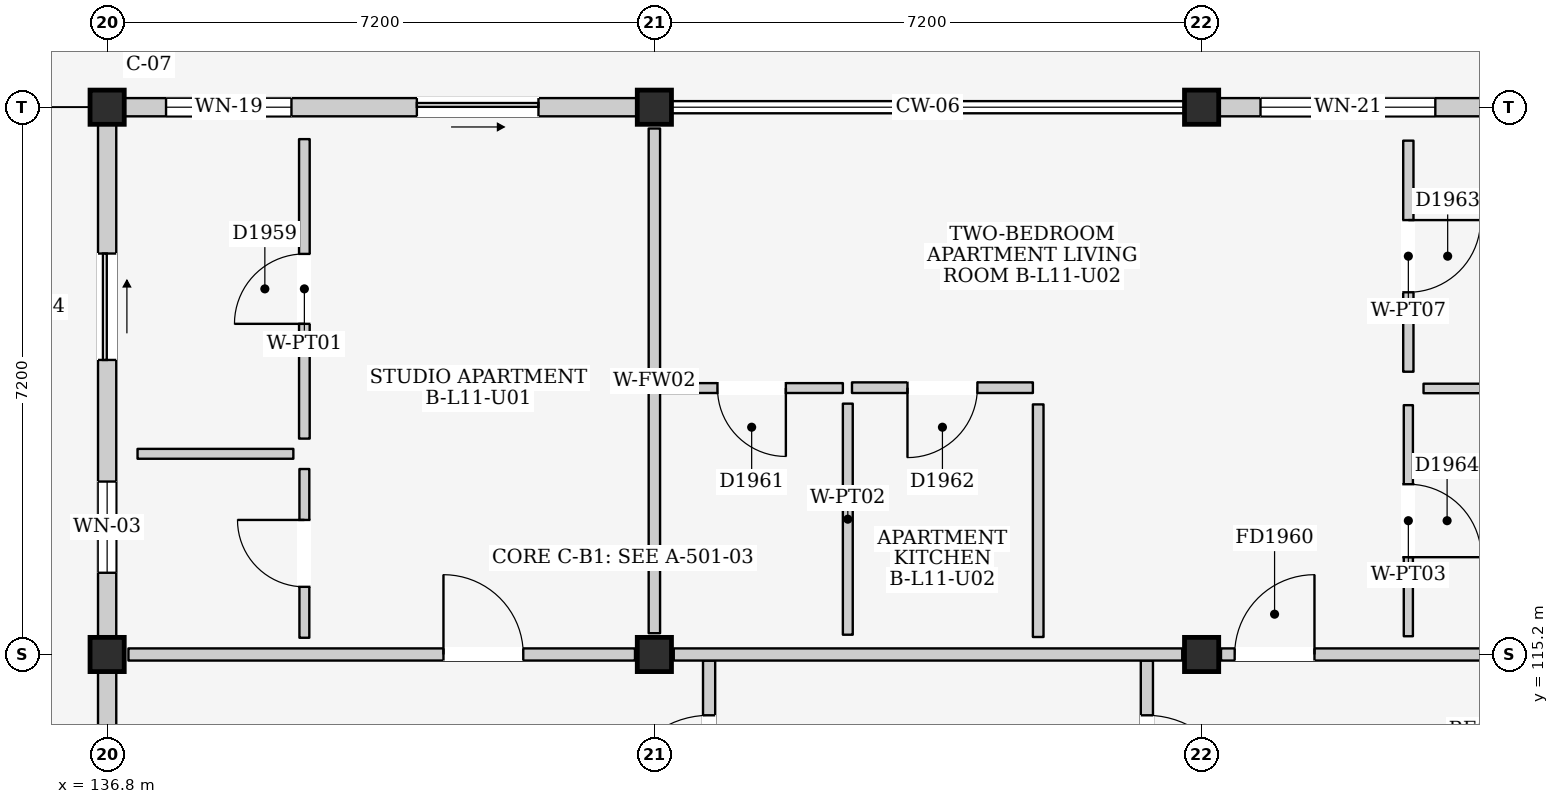
"""IFC4 building model, lengths in metres.
Left out: names, types, materials, properties, quantities, classifications, styles, units other than length and angle.
Written with IfcOpenShell. Run it as: python <this file> out.ifc"""

import sys

from ifc_helpers import new_model, si_unit, direction, frame, frame_2d, origin, origin_2d, place, context, subcontext, project, spatial, rectangle, extrude, element, fill, save


model = new_model("IFC4")
c1 = context("Model", 3, precision=1e-05, world=origin(), true_north=direction((0.0, 1.0)))
c2 = subcontext(c1, "Body", "Model", "MODEL_VIEW")
j1 = project(units=[si_unit("LENGTHUNIT", "METRE"), si_unit("PLANEANGLEUNIT", "RADIAN")], contexts=[c1])
p1 = place(None, origin())
s1 = spatial("IfcSite", under=j1, at=p1, CompositionType="ELEMENT")
p2 = place(p1, origin())
s2 = spatial("IfcBuilding", under=s1, at=p2, CompositionType="ELEMENT")
p3 = place(p2, frame((0.0, 0.0, 38.0)))
s3 = spatial("IfcBuildingStorey", under=s2, at=p3, CompositionType="ELEMENT", Elevation=38.0)
for number, where, z_axis, x_axis in (
    (1, (136.8, 115.2, 0.0), (0.0, 0.0, 1.0), (1.0, 0.0, 0.0)),
    (2, (136.8, 122.4, 0.0), (0.0, 0.0, 1.0), (1.0, 0.0, 0.0)),
    (3, (144.0, 115.2, 0.0), (0.0, 0.0, 1.0), (1.0, 0.0, 0.0)),
    (4, (144.0, 122.4, 0.0), (0.0, 0.0, 1.0), (1.0, 0.0, 0.0)),
    (5, (151.2, 115.2, 0.0), (0.0, 0.0, 1.0), (1.0, 0.0, 0.0)),
    (6, (151.2, 122.4, 0.0), (0.0, 0.0, 1.0), (1.0, 0.0, 0.0)),
):
    element("IfcColumn", number, at=place(p3, frame(where, z_axis=z_axis, x_axis=x_axis)), inside=s3, PredefinedType="COLUMN", context=c2, shape_type="SweptSolid", body=[
        extrude(rectangle(XDim=0.45, YDim=0.45, at=origin_2d()), origin(), (0.0, 0.0, 1.0), 3.2),
    ])
p4 = place(p3, frame((136.8, 108.225, 0.0), z_axis=(0.0, 0.0, 1.0), x_axis=(0.0, 1.0, 0.0)))
e7 = element("IfcWall", 7, at=p4, inside=s3, PredefinedType="ELEMENTEDWALL", context=c2, shape_type="SweptSolid", body=[
    extrude(rectangle(XDim=6.75, YDim=0.24, at=frame_2d((3.375, 0.0))), origin(), (0.0, 0.0, 1.0), 2.475),
])
p5 = place(p4, frame((1.45, 0.0, 1.2)))
e8 = element("IfcOpeningElement", 8, at=p5, cuts=e7, PredefinedType="OPENING", context=c2, shape_type="SweptSolid", body=[
    extrude(rectangle(XDim=1.0, YDim=0.9, at=frame_2d((0.5, 0.45))), frame((0.0, 0.135, 0.0), z_axis=(0.0, -1.0, 0.0), x_axis=(1.0, 0.0, 0.0)), (0.0, 0.0, 1.0), 0.27),
])
p6 = place(p3, frame((137.025, 122.4, 0.0), z_axis=(0.0, 0.0, 1.0), x_axis=(1.0, 0.0, 0.0)))
e9 = element("IfcWall", 9, at=p6, inside=s3, PredefinedType="ELEMENTEDWALL", context=c2, shape_type="SweptSolid", body=[
    extrude(rectangle(XDim=6.75, YDim=0.24, at=frame_2d((3.375, 0.0))), origin(), (0.0, 0.0, 1.0), 2.525),
])
p7 = place(p6, frame((3.85, 0.0, 0.0)))
e10 = element("IfcOpeningElement", 10, at=p7, cuts=e9, PredefinedType="OPENING", context=c2, shape_type="SweptSolid", body=[
    extrude(rectangle(XDim=1.6, YDim=2.12, at=frame_2d((0.8, 1.06))), frame((0.0, 0.135, 0.0), z_axis=(0.0, -1.0, 0.0), x_axis=(1.0, 0.0, 0.0)), (0.0, 0.0, 1.0), 0.27),
])
p8 = place(p6, frame((0.55, 0.0, 0.9)))
e11 = element("IfcOpeningElement", 11, at=p8, cuts=e9, PredefinedType="OPENING", context=c2, shape_type="SweptSolid", body=[
    extrude(rectangle(XDim=1.65, YDim=1.35, at=frame_2d((0.825, 0.675))), frame((0.0, 0.135, 0.0), z_axis=(0.0, -1.0, 0.0), x_axis=(1.0, 0.0, 0.0)), (0.0, 0.0, 1.0), 0.27),
])
p9 = place(p3, frame((136.8, 115.425, 0.0), z_axis=(0.0, 0.0, 1.0), x_axis=(0.0, 1.0, 0.0)))
e12 = element("IfcWall", 12, at=p9, inside=s3, PredefinedType="ELEMENTEDWALL", context=c2, shape_type="SweptSolid", body=[
    extrude(rectangle(XDim=6.75, YDim=0.24, at=frame_2d((3.375, 0.0))), origin(), (0.0, 0.0, 1.0), 2.475),
])
p10 = place(p9, frame((3.65, 0.0, 0.0)))
e13 = element("IfcOpeningElement", 13, at=p10, cuts=e12, PredefinedType="OPENING", context=c2, shape_type="SweptSolid", body=[
    extrude(rectangle(XDim=1.4, YDim=2.1, at=frame_2d((0.7, 1.05))), frame((0.0, 0.135, 0.0), z_axis=(0.0, -1.0, 0.0), x_axis=(1.0, 0.0, 0.0)), (0.0, 0.0, 1.0), 0.27),
])
p11 = place(p9, frame((0.85, 0.0, 0.95)))
e14 = element("IfcOpeningElement", 14, at=p11, cuts=e12, PredefinedType="OPENING", context=c2, shape_type="SweptSolid", body=[
    extrude(rectangle(XDim=1.2, YDim=1.35, at=frame_2d((0.6, 0.675))), frame((0.0, 0.135, 0.0), z_axis=(0.0, -1.0, 0.0), x_axis=(1.0, 0.0, 0.0)), (0.0, 0.0, 1.0), 0.27),
])
p12 = place(p3, frame((151.425, 122.4, 0.0), z_axis=(0.0, 0.0, 1.0), x_axis=(1.0, 0.0, 0.0)))
e15 = element("IfcWall", 15, at=p12, inside=s3, PredefinedType="ELEMENTEDWALL", context=c2, shape_type="SweptSolid", body=[
    extrude(rectangle(XDim=6.75, YDim=0.24, at=frame_2d((3.375, 0.0))), origin(), (0.0, 0.0, 1.0), 2.525),
])
p13 = place(p12, frame((3.85, 0.0, 0.0)))
e16 = element("IfcOpeningElement", 16, at=p13, cuts=e15, PredefinedType="OPENING", context=c2, shape_type="SweptSolid", body=[
    extrude(rectangle(XDim=2.4, YDim=2.12, at=frame_2d((1.2, 1.06))), frame((0.0, 0.135, 0.0), z_axis=(0.0, -1.0, 0.0), x_axis=(1.0, 0.0, 0.0)), (0.0, 0.0, 1.0), 0.27),
])
p14 = place(p12, frame((0.55, 0.0, 0.815)))
e17 = element("IfcOpeningElement", 17, at=p14, cuts=e15, PredefinedType="OPENING", context=c2, shape_type="SweptSolid", body=[
    extrude(rectangle(XDim=2.3, YDim=1.6, at=frame_2d((1.15, 0.8))), frame((0.0, 0.135, 0.0), z_axis=(0.0, -1.0, 0.0), x_axis=(1.0, 0.0, 0.0)), (0.0, 0.0, 1.0), 0.27),
])
p15 = place(p3, frame((144.72, 111.1, 0.0), z_axis=(0.0, 0.0, 1.0), x_axis=(0.0, 1.0, 0.0)))
e18 = element("IfcWall", 18, at=p15, inside=s3, PredefinedType="PARTITIONING", context=c2, shape_type="SweptSolid", body=[
    extrude(rectangle(XDim=4.02, YDim=0.16, at=frame_2d((2.01, 0.0))), origin(), (0.0, 0.0, 1.0), 2.99),
])
p16 = place(p15, frame((2.1, 0.0, 0.0)))
e19 = element("IfcOpeningElement", 19, at=p16, cuts=e18, PredefinedType="OPENING", context=c2, shape_type="SweptSolid", body=[
    extrude(rectangle(XDim=1.2, YDim=2.2, at=frame_2d((0.6, 1.1))), frame((0.0, 0.095, 0.0), z_axis=(0.0, -1.0, 0.0), x_axis=(1.0, 0.0, 0.0)), (0.0, 0.0, 1.0), 0.19),
])
p17 = place(p3, frame((150.48, 111.1, 0.0), z_axis=(0.0, 0.0, 1.0), x_axis=(0.0, 1.0, 0.0)))
e20 = element("IfcWall", 20, at=p17, inside=s3, PredefinedType="PARTITIONING", context=c2, shape_type="SweptSolid", body=[
    extrude(rectangle(XDim=4.02, YDim=0.16, at=frame_2d((2.01, 0.0))), origin(), (0.0, 0.0, 1.0), 2.99),
])
p18 = place(p17, frame((2.1, 0.0, 0.0)))
e21 = element("IfcOpeningElement", 21, at=p18, cuts=e20, PredefinedType="OPENING", context=c2, shape_type="SweptSolid", body=[
    extrude(rectangle(XDim=1.2, YDim=2.2, at=frame_2d((0.6, 1.1))), frame((0.0, 0.095, 0.0), z_axis=(0.0, -1.0, 0.0), x_axis=(1.0, 0.0, 0.0)), (0.0, 0.0, 1.0), 0.19),
])
p19 = place(p3, frame((137.08, 115.2, 0.0), z_axis=(0.0, 0.0, 1.0), x_axis=(1.0, 0.0, 0.0)))
e22 = element("IfcWall", 22, at=p19, inside=s3, PredefinedType="PARTITIONING", context=c2, shape_type="SweptSolid", body=[
    extrude(rectangle(XDim=6.665, YDim=0.16, at=frame_2d((3.333, 0.0))), origin(), (0.0, 0.0, 1.0), 2.375),
])
p20 = place(p19, frame((4.145, 0.0, 0.0)))
e23 = element("IfcOpeningElement", 23, at=p20, cuts=e22, PredefinedType="OPENING", context=c2, shape_type="SweptSolid", body=[
    extrude(rectangle(XDim=1.05, YDim=2.15, at=frame_2d((0.525, 1.075))), frame((0.0, 0.095, 0.0), z_axis=(0.0, -1.0, 0.0), x_axis=(1.0, 0.0, 0.0)), (0.0, 0.0, 1.0), 0.19),
])
p21 = place(p3, frame((144.0, 115.48, 0.0), z_axis=(0.0, 0.0, 1.0), x_axis=(0.0, 1.0, 0.0)))
e24 = element("IfcWall", 24, at=p21, inside=s3, PredefinedType="PARTITIONING", context=c2, shape_type="SweptSolid", body=[
    extrude(rectangle(XDim=6.64, YDim=0.15, at=frame_2d((3.32, 0.0))), origin(), (0.0, 0.0, 1.0), 2.475),
])
p22 = place(p3, frame((137.2, 117.84, 0.0), z_axis=(0.0, 0.0, 1.0), x_axis=(1.0, 0.0, 0.0)))
e25 = element("IfcWall", 25, at=p22, inside=s3, PredefinedType="PARTITIONING", context=c2, shape_type="SweptSolid", body=[
    extrude(rectangle(XDim=2.05, YDim=0.13, at=frame_2d((1.025, 0.0))), origin(), (0.0, 0.0, 1.0), 2.99),
])
p23 = place(p3, frame((139.395, 115.42, 0.0), z_axis=(0.0, 0.0, 1.0), x_axis=(0.0, 1.0, 0.0)))
e26 = element("IfcWall", 26, at=p23, inside=s3, PredefinedType="PARTITIONING", context=c2, shape_type="SweptSolid", body=[
    extrude(rectangle(XDim=2.22, YDim=0.13, at=frame_2d((1.11, 0.0))), origin(), (0.0, 0.0, 1.0), 2.99),
])
p24 = place(p23, frame((0.67, 0.0, 0.0)))
e27 = element("IfcOpeningElement", 27, at=p24, cuts=e26, PredefinedType="OPENING", context=c2, shape_type="SweptSolid", body=[
    extrude(rectangle(XDim=0.88, YDim=2.1, at=frame_2d((0.44, 1.05))), frame((0.0, 0.08, 0.0), z_axis=(0.0, -1.0, 0.0), x_axis=(1.0, 0.0, 0.0)), (0.0, 0.0, 1.0), 0.16),
])
p25 = place(p3, frame((139.395, 118.04, 0.0), z_axis=(0.0, 0.0, 1.0), x_axis=(0.0, 1.0, 0.0)))
e28 = element("IfcWall", 28, at=p25, inside=s3, PredefinedType="PARTITIONING", context=c2, shape_type="SweptSolid", body=[
    extrude(rectangle(XDim=3.94, YDim=0.14, at=frame_2d((1.97, 0.0))), origin(), (0.0, 0.0, 1.0), 2.99),
])
p26 = place(p25, frame((1.51, 0.0, 0.0)))
e29 = element("IfcOpeningElement", 29, at=p26, cuts=e28, PredefinedType="OPENING", context=c2, shape_type="SweptSolid", body=[
    extrude(rectangle(XDim=0.92, YDim=2.1, at=frame_2d((0.46, 1.05))), frame((0.0, 0.085, 0.0), z_axis=(0.0, -1.0, 0.0), x_axis=(1.0, 0.0, 0.0)), (0.0, 0.0, 1.0), 0.17),
])
p27 = place(p3, frame((144.255, 115.2, 0.0), z_axis=(0.0, 0.0, 1.0), x_axis=(1.0, 0.0, 0.0)))
e30 = element("IfcWall", 30, at=p27, inside=s3, PredefinedType="PARTITIONING", context=c2, shape_type="SweptSolid", body=[
    extrude(rectangle(XDim=6.69, YDim=0.16, at=frame_2d((3.345, 0.0))), origin(), (0.0, 0.0, 1.0), 2.375),
])
p28 = place(p3, frame((151.455, 115.2, 0.0), z_axis=(0.0, 0.0, 1.0), x_axis=(1.0, 0.0, 0.0)))
e31 = element("IfcWall", 31, at=p28, inside=s3, PredefinedType="PARTITIONING", context=c2, shape_type="SweptSolid", body=[
    extrude(rectangle(XDim=6.69, YDim=0.16, at=frame_2d((3.345, 0.0))), origin(), (0.0, 0.0, 1.0), 2.375),
])
p29 = place(p28, frame((0.18, 0.0, 0.0)))
e32 = element("IfcOpeningElement", 32, at=p29, cuts=e31, PredefinedType="OPENING", context=c2, shape_type="SweptSolid", body=[
    extrude(rectangle(XDim=1.05, YDim=2.15, at=frame_2d((0.525, 1.075))), frame((0.0, 0.095, 0.0), z_axis=(0.0, -1.0, 0.0), x_axis=(1.0, 0.0, 0.0)), (0.0, 0.0, 1.0), 0.19),
])
p30 = place(p3, frame((144.08, 118.705, 0.0), z_axis=(0.0, 0.0, 1.0), x_axis=(1.0, 0.0, 0.0)))
e33 = element("IfcWall", 33, at=p30, inside=s3, PredefinedType="PARTITIONING", context=c2, shape_type="SweptSolid", body=[
    extrude(rectangle(XDim=2.4, YDim=0.13, at=frame_2d((1.2, 0.0))), origin(), (0.0, 0.0, 1.0), 2.99),
])
p31 = place(p30, frame((0.75, 0.0, 0.0)))
e34 = element("IfcOpeningElement", 34, at=p31, cuts=e33, PredefinedType="OPENING", context=c2, shape_type="SweptSolid", body=[
    extrude(rectangle(XDim=0.9, YDim=2.1, at=frame_2d((0.45, 1.05))), frame((0.0, 0.08, 0.0), z_axis=(0.0, -1.0, 0.0), x_axis=(1.0, 0.0, 0.0)), (0.0, 0.0, 1.0), 0.16),
])
p32 = place(p3, frame((146.545, 115.46, 0.0), z_axis=(0.0, 0.0, 1.0), x_axis=(0.0, 1.0, 0.0)))
e35 = element("IfcWall", 35, at=p32, inside=s3, PredefinedType="PARTITIONING", context=c2, shape_type="SweptSolid", body=[
    extrude(rectangle(XDim=3.04, YDim=0.13, at=frame_2d((1.52, 0.0))), origin(), (0.0, 0.0, 1.0), 2.99),
])
p33 = place(p3, frame((146.6, 118.71, 0.0), z_axis=(0.0, 0.0, 1.0), x_axis=(1.0, 0.0, 0.0)))
e36 = element("IfcWall", 36, at=p33, inside=s3, PredefinedType="PARTITIONING", context=c2, shape_type="SweptSolid", body=[
    extrude(rectangle(XDim=2.38, YDim=0.14, at=frame_2d((1.19, 0.0))), origin(), (0.0, 0.0, 1.0), 2.99),
])
p34 = place(p33, frame((0.73, 0.0, 0.0)))
e37 = element("IfcOpeningElement", 37, at=p34, cuts=e36, PredefinedType="OPENING", context=c2, shape_type="SweptSolid", body=[
    extrude(rectangle(XDim=0.92, YDim=2.1, at=frame_2d((0.46, 1.05))), frame((0.0, 0.085, 0.0), z_axis=(0.0, -1.0, 0.0), x_axis=(1.0, 0.0, 0.0)), (0.0, 0.0, 1.0), 0.17),
])
p35 = place(p3, frame((149.05, 115.43, 0.0), z_axis=(0.0, 0.0, 1.0), x_axis=(0.0, 1.0, 0.0)))
e38 = element("IfcWall", 38, at=p35, inside=s3, PredefinedType="PARTITIONING", context=c2, shape_type="SweptSolid", body=[
    extrude(rectangle(XDim=3.06, YDim=0.14, at=frame_2d((1.53, 0.0))), origin(), (0.0, 0.0, 1.0), 2.99),
])
p36 = place(p3, frame((153.92, 118.92, 0.0), z_axis=(0.0, 0.0, 1.0), x_axis=(0.0, 1.0, 0.0)))
e39 = element("IfcWall", 39, at=p36, inside=s3, PredefinedType="PARTITIONING", context=c2, shape_type="SweptSolid", body=[
    extrude(rectangle(XDim=3.04, YDim=0.135, at=frame_2d((1.52, 0.0))), origin(), (0.0, 0.0, 1.0), 2.99),
])
p37 = place(p36, frame((1.045, 0.0, 0.0)))
e40 = element("IfcOpeningElement", 40, at=p37, cuts=e39, PredefinedType="OPENING", context=c2, shape_type="SweptSolid", body=[
    extrude(rectangle(XDim=0.95, YDim=2.15, at=frame_2d((0.475, 1.075))), frame((0.0, 0.083, 0.0), z_axis=(0.0, -1.0, 0.0), x_axis=(1.0, 0.0, 0.0)), (0.0, 0.0, 1.0), 0.165),
])
p38 = place(p3, frame((154.12, 118.7, 0.0), z_axis=(0.0, 0.0, 1.0), x_axis=(1.0, 0.0, 0.0)))
e41 = element("IfcWall", 41, at=p38, inside=s3, PredefinedType="PARTITIONING", context=c2, shape_type="SweptSolid", body=[
    extrude(rectangle(XDim=4.06, YDim=0.125, at=frame_2d((2.03, 0.0))), origin(), (0.0, 0.0, 1.0), 2.99),
])
p39 = place(p3, frame((153.92, 115.44, 0.0), z_axis=(0.0, 0.0, 1.0), x_axis=(0.0, 1.0, 0.0)))
e42 = element("IfcWall", 42, at=p39, inside=s3, PredefinedType="PARTITIONING", context=c2, shape_type="SweptSolid", body=[
    extrude(rectangle(XDim=3.04, YDim=0.12, at=frame_2d((1.52, 0.0))), origin(), (0.0, 0.0, 1.0), 2.99),
])
p40 = place(p39, frame((1.04, 0.0, 0.0)))
e43 = element("IfcOpeningElement", 43, at=p40, cuts=e42, PredefinedType="OPENING", context=c2, shape_type="SweptSolid", body=[
    extrude(rectangle(XDim=0.96, YDim=2.15, at=frame_2d((0.48, 1.075))), frame((0.0, 0.075, 0.0), z_axis=(0.0, -1.0, 0.0), x_axis=(1.0, 0.0, 0.0)), (0.0, 0.0, 1.0), 0.15),
])
p41 = place(p7, frame((1.6, 0.0, 0.0), z_axis=(0.0, 0.0, 1.0), x_axis=(-1.0, 0.0, 0.0)))
e44 = element("IfcDoor", 44, at=p41, inside=s3, OperationType="SLIDING_TO_RIGHT", PredefinedType="DOOR", context=c2, shape_type="SweptSolid", body=[
    extrude(rectangle(XDim=1.6, YDim=2.12, at=frame_2d((0.8, 1.06))), frame((0.0, 0.025, 0.0), z_axis=(0.0, -1.0, 0.0), x_axis=(1.0, 0.0, 0.0)), (0.0, 0.0, 1.0), 0.05),
])
fill(e10, e44)
p42 = place(p8, origin())
e45 = element("IfcWindow", 45, at=p42, inside=s3, PartitioningType="DOUBLE_PANEL_VERTICAL", PredefinedType="WINDOW", context=c2, shape_type="SweptSolid", body=[
    extrude(rectangle(XDim=1.65, YDim=1.35, at=frame_2d((0.825, 0.675))), frame((0.0, 0.03, 0.0), z_axis=(0.0, -1.0, 0.0), x_axis=(1.0, 0.0, 0.0)), (0.0, 0.0, 1.0), 0.06),
])
fill(e11, e45)
p43 = place(p10, frame((1.4, 0.0, 0.0), z_axis=(0.0, 0.0, 1.0), x_axis=(-1.0, 0.0, 0.0)))
e46 = element("IfcDoor", 46, at=p43, inside=s3, OperationType="SLIDING_TO_RIGHT", PredefinedType="DOOR", context=c2, shape_type="SweptSolid", body=[
    extrude(rectangle(XDim=1.4, YDim=2.1, at=frame_2d((0.7, 1.05))), frame((0.0, 0.025, 0.0), z_axis=(0.0, -1.0, 0.0), x_axis=(1.0, 0.0, 0.0)), (0.0, 0.0, 1.0), 0.05),
])
fill(e13, e46)
p44 = place(p11, origin())
e47 = element("IfcWindow", 47, at=p44, inside=s3, PartitioningType="SINGLE_PANEL", PredefinedType="WINDOW", context=c2, shape_type="SweptSolid", body=[
    extrude(rectangle(XDim=1.2, YDim=1.35, at=frame_2d((0.6, 0.675))), frame((0.0, 0.03, 0.0), z_axis=(0.0, -1.0, 0.0), x_axis=(1.0, 0.0, 0.0)), (0.0, 0.0, 1.0), 0.06),
])
fill(e14, e47)
p45 = place(p14, origin())
e48 = element("IfcWindow", 48, at=p45, inside=s3, PartitioningType="TRIPLE_PANEL_VERTICAL", PredefinedType="WINDOW", context=c2, shape_type="SweptSolid", body=[
    extrude(rectangle(XDim=2.3, YDim=1.6, at=frame_2d((1.15, 0.8))), frame((0.0, 0.03, 0.0), z_axis=(0.0, -1.0, 0.0), x_axis=(1.0, 0.0, 0.0)), (0.0, 0.0, 1.0), 0.06),
])
fill(e17, e48)
p46 = place(p16, origin())
e49 = element("IfcDoor", 49, at=p46, inside=s3, OperationType="SINGLE_SWING_LEFT", PredefinedType="DOOR", context=c2, shape_type="SweptSolid", body=[
    extrude(rectangle(XDim=1.2, YDim=2.2, at=frame_2d((0.6, 1.1))), frame((0.0, 0.025, 0.0), z_axis=(0.0, -1.0, 0.0), x_axis=(1.0, 0.0, 0.0)), (0.0, 0.0, 1.0), 0.05),
])
fill(e19, e49)
p47 = place(p18, frame((1.2, 0.0, 0.0), z_axis=(0.0, 0.0, 1.0), x_axis=(-1.0, 0.0, 0.0)))
e50 = element("IfcDoor", 50, at=p47, inside=s3, OperationType="SINGLE_SWING_RIGHT", PredefinedType="DOOR", context=c2, shape_type="SweptSolid", body=[
    extrude(rectangle(XDim=1.2, YDim=2.2, at=frame_2d((0.6, 1.1))), frame((0.0, 0.025, 0.0), z_axis=(0.0, -1.0, 0.0), x_axis=(1.0, 0.0, 0.0)), (0.0, 0.0, 1.0), 0.05),
])
fill(e21, e50)
p48 = place(p20, origin())
e51 = element("IfcDoor", 51, at=p48, inside=s3, OperationType="SINGLE_SWING_LEFT", PredefinedType="DOOR", context=c2, shape_type="SweptSolid", body=[
    extrude(rectangle(XDim=1.05, YDim=2.15, at=frame_2d((0.525, 1.075))), frame((0.0, 0.025, 0.0), z_axis=(0.0, -1.0, 0.0), x_axis=(1.0, 0.0, 0.0)), (0.0, 0.0, 1.0), 0.05),
])
fill(e23, e51)
p49 = place(p24, origin())
e52 = element("IfcDoor", 52, at=p49, inside=s3, OperationType="SINGLE_SWING_RIGHT", PredefinedType="DOOR", context=c2, shape_type="SweptSolid", body=[
    extrude(rectangle(XDim=0.88, YDim=2.1, at=frame_2d((0.44, 1.05))), frame((0.0, 0.025, 0.0), z_axis=(0.0, -1.0, 0.0), x_axis=(1.0, 0.0, 0.0)), (0.0, 0.0, 1.0), 0.05),
])
fill(e27, e52)
p50 = place(p26, origin())
e53 = element("IfcDoor", 53, at=p50, inside=s3, OperationType="SINGLE_SWING_LEFT", PredefinedType="DOOR", context=c2, shape_type="SweptSolid", body=[
    extrude(rectangle(XDim=0.92, YDim=2.1, at=frame_2d((0.46, 1.05))), frame((0.0, 0.025, 0.0), z_axis=(0.0, -1.0, 0.0), x_axis=(1.0, 0.0, 0.0)), (0.0, 0.0, 1.0), 0.05),
])
fill(e29, e53)
p51 = place(p29, origin())
e54 = element("IfcDoor", 54, at=p51, inside=s3, OperationType="SINGLE_SWING_RIGHT", PredefinedType="DOOR", context=c2, shape_type="SweptSolid", body=[
    extrude(rectangle(XDim=1.05, YDim=2.15, at=frame_2d((0.525, 1.075))), frame((0.0, 0.025, 0.0), z_axis=(0.0, -1.0, 0.0), x_axis=(1.0, 0.0, 0.0)), (0.0, 0.0, 1.0), 0.05),
])
fill(e32, e54)
p52 = place(p31, frame((0.9, 0.0, 0.0), z_axis=(0.0, 0.0, 1.0), x_axis=(-1.0, 0.0, 0.0)))
e55 = element("IfcDoor", 55, at=p52, inside=s3, OperationType="SINGLE_SWING_LEFT", PredefinedType="DOOR", context=c2, shape_type="SweptSolid", body=[
    extrude(rectangle(XDim=0.9, YDim=2.1, at=frame_2d((0.45, 1.05))), frame((0.0, 0.025, 0.0), z_axis=(0.0, -1.0, 0.0), x_axis=(1.0, 0.0, 0.0)), (0.0, 0.0, 1.0), 0.05),
])
fill(e34, e55)
p53 = place(p34, frame((0.92, 0.0, 0.0), z_axis=(0.0, 0.0, 1.0), x_axis=(-1.0, 0.0, 0.0)))
e56 = element("IfcDoor", 56, at=p53, inside=s3, OperationType="SINGLE_SWING_RIGHT", PredefinedType="DOOR", context=c2, shape_type="SweptSolid", body=[
    extrude(rectangle(XDim=0.92, YDim=2.1, at=frame_2d((0.46, 1.05))), frame((0.0, 0.025, 0.0), z_axis=(0.0, -1.0, 0.0), x_axis=(1.0, 0.0, 0.0)), (0.0, 0.0, 1.0), 0.05),
])
fill(e37, e56)
p54 = place(p37, frame((0.95, 0.0, 0.0), z_axis=(0.0, 0.0, 1.0), x_axis=(-1.0, 0.0, 0.0)))
e57 = element("IfcDoor", 57, at=p54, inside=s3, OperationType="SINGLE_SWING_LEFT", PredefinedType="DOOR", context=c2, shape_type="SweptSolid", body=[
    extrude(rectangle(XDim=0.95, YDim=2.15, at=frame_2d((0.475, 1.075))), frame((0.0, 0.025, 0.0), z_axis=(0.0, -1.0, 0.0), x_axis=(1.0, 0.0, 0.0)), (0.0, 0.0, 1.0), 0.05),
])
fill(e40, e57)
p55 = place(p40, frame((0.96, 0.0, 0.0), z_axis=(0.0, 0.0, 1.0), x_axis=(-1.0, 0.0, 0.0)))
e58 = element("IfcDoor", 58, at=p55, inside=s3, OperationType="SINGLE_SWING_RIGHT", PredefinedType="DOOR", context=c2, shape_type="SweptSolid", body=[
    extrude(rectangle(XDim=0.96, YDim=2.15, at=frame_2d((0.48, 1.075))), frame((0.0, 0.025, 0.0), z_axis=(0.0, -1.0, 0.0), x_axis=(1.0, 0.0, 0.0)), (0.0, 0.0, 1.0), 0.05),
])
fill(e43, e58)
save(model, sys.argv[1])
